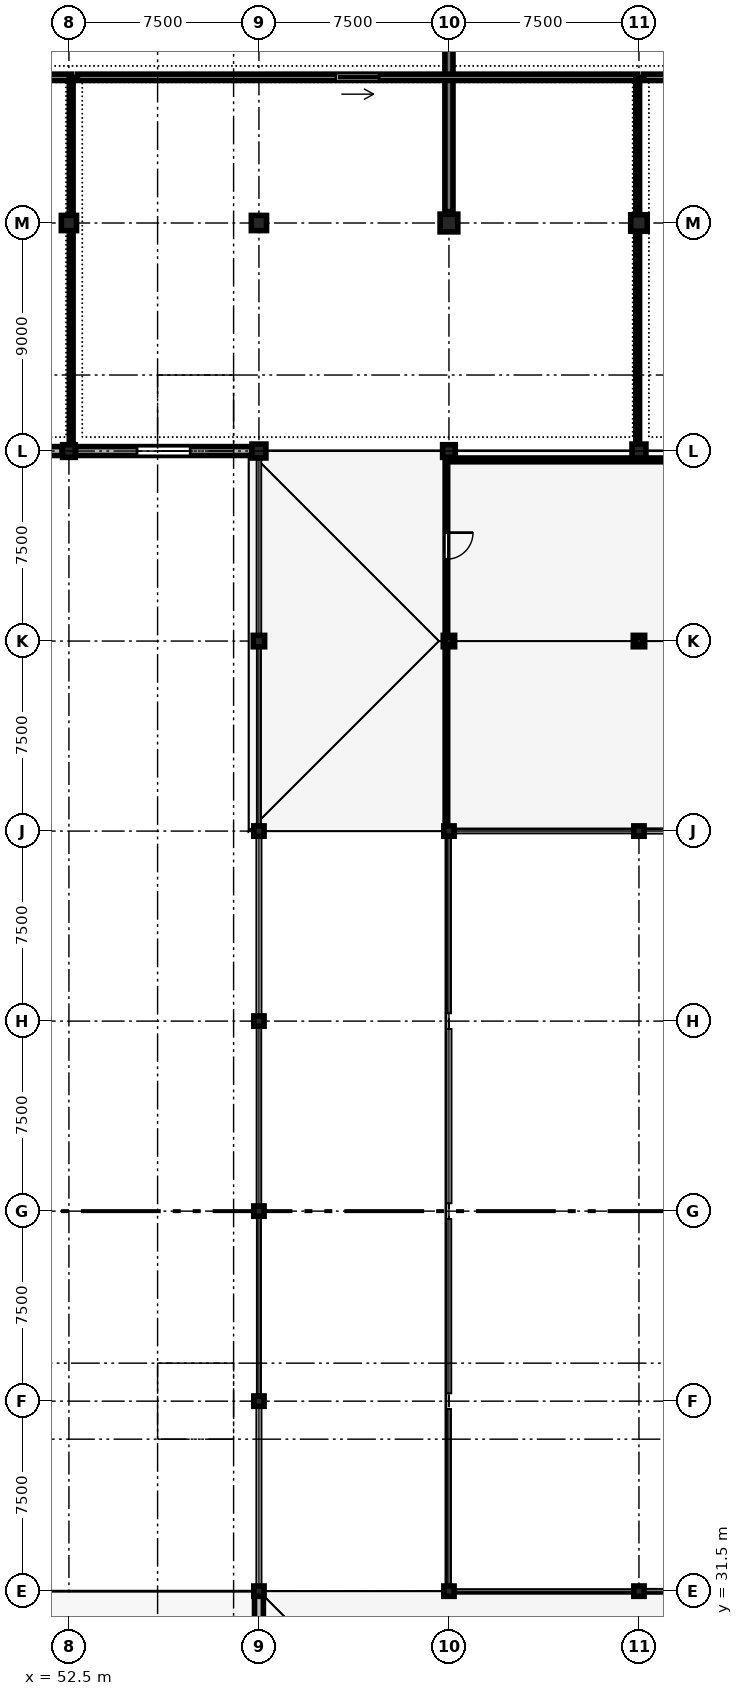
"""IFC4 building model, lengths in metres.
Left out: names, types, materials, properties, quantities, classifications, styles, units other than length and angle.
Written with IfcOpenShell. Run it as: python <this file> out.ifc"""

import sys

from ifc_helpers import new_model, si_unit, direction, frame, frame_2d, origin, origin_2d, place, context, subcontext, project, spatial, rectangle, circle, hollow_circle, i_section, extrude, element, fill, save


model = new_model("IFC4")
c1 = context("Model", 3, precision=1e-05, world=origin(), true_north=direction((0.0, 1.0)))
c2 = subcontext(c1, "Body", "Model", "MODEL_VIEW")
j1 = project(units=[si_unit("LENGTHUNIT", "METRE"), si_unit("PLANEANGLEUNIT", "RADIAN")], contexts=[c1])
p1 = place(None, origin())
s1 = spatial("IfcSite", under=j1, at=p1, CompositionType="ELEMENT")
p2 = place(p1, origin())
s2 = spatial("IfcBuilding", under=s1, at=p2, CompositionType="ELEMENT")
p3 = place(p2, frame((0.0, 0.0, 9.3)))
s3 = spatial("IfcBuildingStorey", under=s2, at=p3, CompositionType="ELEMENT", Elevation=9.3)
p4 = place(p3, frame((52.5, 76.5, 0.0), z_axis=(0.0, 0.0, 1.0), x_axis=(1.0, 0.0, 0.0)))
e1 = element("IfcColumn", 1, at=p4, inside=s3, PredefinedType="COLUMN", context=c2, shape_type="SweptSolid", body=[
    extrude(rectangle(XDim=0.5, YDim=0.5, at=origin_2d()), origin(), (0.0, 0.0, 1.0), 4.8),
])
p5 = place(p3, frame((52.5, 85.5, 0.0), z_axis=(0.0, 0.0, 1.0), x_axis=(1.0, 0.0, 0.0)))
e2 = element("IfcColumn", 2, at=p5, inside=s3, PredefinedType="COLUMN", context=c2, shape_type="SweptSolid", body=[
    extrude(circle(Radius=0.3, at=origin_2d()), origin(), (0.0, 0.0, 1.0), 4.8),
])
for number, where, z_axis, x_axis in (
    (3, (60.0, 31.5, 0.0), (0.0, 0.0, 1.0), (1.0, 0.0, 0.0)),
    (4, (60.0, 39.0, 0.0), (0.0, 0.0, 1.0), (1.0, 0.0, 0.0)),
    (5, (60.0, 46.5, 0.0), (0.0, 0.0, 1.0), (1.0, 0.0, 0.0)),
    (6, (60.0, 54.0, 0.0), (0.0, 0.0, 1.0), (1.0, 0.0, 0.0)),
    (7, (60.0, 61.5, 0.0), (0.0, 0.0, 1.0), (1.0, 0.0, 0.0)),
):
    element("IfcColumn", number, at=place(p3, frame(where, z_axis=z_axis, x_axis=x_axis)), inside=s3, PredefinedType="COLUMN", context=c2, shape_type="SweptSolid", body=[
        extrude(i_section(OverallWidth=0.3, OverallDepth=0.36, WebThickness=0.012, FlangeThickness=0.022, FilletRadius=0.027, at=origin_2d()), origin(), (0.0, 0.0, 1.0), 4.8),
    ])
p6 = place(p3, frame((60.0, 69.0, 0.0), z_axis=(0.0, 0.0, 1.0), x_axis=(1.0, 0.0, 0.0)))
e8 = element("IfcColumn", 8, at=p6, inside=s3, PredefinedType="COLUMN", context=c2, shape_type="SweptSolid", body=[
    extrude(rectangle(XDim=0.45, YDim=0.45, at=origin_2d()), origin(), (0.0, 0.0, 1.0), 4.8),
])
p7 = place(p3, frame((60.0, 76.5, 0.0), z_axis=(0.0, 0.0, 1.0), x_axis=(1.0, 0.0, 0.0)))
e9 = element("IfcColumn", 9, at=p7, inside=s3, PredefinedType="COLUMN", context=c2, shape_type="SweptSolid", body=[
    extrude(rectangle(XDim=0.55, YDim=0.55, at=origin_2d()), origin(), (0.0, 0.0, 1.0), 4.8),
])
p8 = place(p3, frame((60.0, 85.5, 0.0), z_axis=(0.0, 0.0, 1.0), x_axis=(1.0, 0.0, 0.0)))
e10 = element("IfcColumn", 10, at=p8, inside=s3, PredefinedType="COLUMN", context=c2, shape_type="SweptSolid", body=[
    extrude(rectangle(XDim=0.6, YDim=0.6, at=origin_2d()), origin(), (0.0, 0.0, 1.0), 4.8),
])
for number, where, z_axis, x_axis in (
    (11, (67.5, 31.5, 0.0), (0.0, 0.0, 1.0), (1.0, 0.0, 0.0)),
    (12, (67.5, 61.5, 0.0), (0.0, 0.0, 1.0), (1.0, 0.0, 0.0)),
):
    element("IfcColumn", number, at=place(p3, frame(where, z_axis=z_axis, x_axis=x_axis)), inside=s3, PredefinedType="COLUMN", context=c2, shape_type="SweptSolid", body=[
        extrude(i_section(OverallWidth=0.3, OverallDepth=0.36, WebThickness=0.012, FlangeThickness=0.022, FilletRadius=0.027, at=origin_2d()), origin(), (0.0, 0.0, 1.0), 4.8),
    ])
p9 = place(p3, frame((67.5, 69.0, 0.0), z_axis=(0.0, 0.0, 1.0), x_axis=(1.0, 0.0, 0.0)))
e13 = element("IfcColumn", 13, at=p9, inside=s3, PredefinedType="COLUMN", context=c2, shape_type="SweptSolid", body=[
    extrude(rectangle(XDim=0.45, YDim=0.45, at=origin_2d()), origin(), (0.0, 0.0, 1.0), 4.8),
])
p10 = place(p3, frame((67.5, 76.5, 0.0), z_axis=(0.0, 0.0, 1.0), x_axis=(1.0, 0.0, 0.0)))
e14 = element("IfcColumn", 14, at=p10, inside=s3, PredefinedType="COLUMN", context=c2, shape_type="SweptSolid", body=[
    extrude(rectangle(XDim=0.5, YDim=0.5, at=origin_2d()), origin(), (0.0, 0.0, 1.0), 4.8),
])
p11 = place(p3, frame((67.5, 85.5, 0.0), z_axis=(0.0, 0.0, 1.0), x_axis=(1.0, 0.0, 0.0)))
e15 = element("IfcColumn", 15, at=p11, inside=s3, PredefinedType="COLUMN", context=c2, shape_type="SweptSolid", body=[
    extrude(rectangle(XDim=0.7, YDim=0.7, at=origin_2d()), origin(), (0.0, 0.0, 1.0), 4.8),
])
for number, where, z_axis, x_axis in (
    (16, (75.0, 31.5, 0.0), (0.0, 0.0, 1.0), (1.0, 0.0, 0.0)),
    (17, (75.0, 61.5, 0.0), (0.0, 0.0, 1.0), (1.0, 0.0, 0.0)),
):
    element("IfcColumn", number, at=place(p3, frame(where, z_axis=z_axis, x_axis=x_axis)), inside=s3, PredefinedType="COLUMN", context=c2, shape_type="SweptSolid", body=[
        extrude(i_section(OverallWidth=0.3, OverallDepth=0.36, WebThickness=0.012, FlangeThickness=0.022, FilletRadius=0.027, at=origin_2d()), origin(), (0.0, 0.0, 1.0), 4.8),
    ])
p12 = place(p3, frame((75.0, 69.0, 0.0), z_axis=(0.0, 0.0, 1.0), x_axis=(1.0, 0.0, 0.0)))
e18 = element("IfcColumn", 18, at=p12, inside=s3, PredefinedType="COLUMN", context=c2, shape_type="SweptSolid", body=[
    extrude(rectangle(XDim=0.45, YDim=0.45, at=origin_2d()), origin(), (0.0, 0.0, 1.0), 4.8),
])
p13 = place(p3, frame((75.0, 76.5, 0.0), z_axis=(0.0, 0.0, 1.0), x_axis=(1.0, 0.0, 0.0)))
e19 = element("IfcColumn", 19, at=p13, inside=s3, PredefinedType="COLUMN", context=c2, shape_type="SweptSolid", body=[
    extrude(rectangle(XDim=0.55, YDim=0.55, at=origin_2d()), origin(), (0.0, 0.0, 1.0), 4.8),
])
p14 = place(p3, frame((75.0, 85.5, 0.0), z_axis=(0.0, 0.0, 1.0), x_axis=(1.0, 0.0, 0.0)))
e20 = element("IfcColumn", 20, at=p14, inside=s3, PredefinedType="COLUMN", context=c2, shape_type="SweptSolid", body=[
    extrude(rectangle(XDim=0.65, YDim=0.65, at=origin_2d()), origin(), (0.0, 0.0, 1.0), 4.8),
])
p15 = place(p3, frame((67.5, 85.95, 0.0), z_axis=(0.0, 0.0, 1.0), x_axis=(0.0, 1.0, 0.0)))
e21 = element("IfcWall", 21, at=p15, inside=s3, PredefinedType="SHEAR", context=c2, shape_type="SweptSolid", body=[
    extrude(rectangle(XDim=6.6, YDim=0.32, at=frame_2d((3.3, 0.0))), origin(), (0.0, 0.0, 1.0), 4.0),
])
p16 = place(p3, frame((60.0, 31.5, 4.8), z_axis=(0.0, 0.0, 1.0), x_axis=(1.0, 0.0, 0.0)))
e22 = element("IfcColumn", 22, at=p16, inside=s3, PredefinedType="COLUMN", context=c2, shape_type="SweptSolid", body=[
    extrude(hollow_circle(Radius=0.203, WallThickness=0.016, at=origin_2d()), origin(), (0.0, 0.0, 1.0), 2.75),
])
p17 = place(p3, frame((60.0, 39.0, 4.8), z_axis=(0.0, 0.0, 1.0), x_axis=(1.0, 0.0, 0.0)))
e23 = element("IfcColumn", 23, at=p17, inside=s3, PredefinedType="COLUMN", context=c2, shape_type="SweptSolid", body=[
    extrude(hollow_circle(Radius=0.203, WallThickness=0.016, at=origin_2d()), origin(), (0.0, 0.0, 1.0), 4.4),
])
p18 = place(p3, frame((60.0, 46.5, 4.8), z_axis=(0.0, 0.0, 1.0), x_axis=(1.0, 0.0, 0.0)))
e24 = element("IfcColumn", 24, at=p18, inside=s3, PredefinedType="COLUMN", context=c2, shape_type="SweptSolid", body=[
    extrude(hollow_circle(Radius=0.203, WallThickness=0.016, at=origin_2d()), origin(), (0.0, 0.0, 1.0), 4.95),
])
p19 = place(p3, frame((60.0, 54.0, 4.8), z_axis=(0.0, 0.0, 1.0), x_axis=(1.0, 0.0, 0.0)))
e25 = element("IfcColumn", 25, at=p19, inside=s3, PredefinedType="COLUMN", context=c2, shape_type="SweptSolid", body=[
    extrude(hollow_circle(Radius=0.203, WallThickness=0.016, at=origin_2d()), origin(), (0.0, 0.0, 1.0), 4.4),
])
p20 = place(p3, frame((60.0, 61.5, 4.8), z_axis=(0.0, 0.0, 1.0), x_axis=(1.0, 0.0, 0.0)))
e26 = element("IfcColumn", 26, at=p20, inside=s3, PredefinedType="COLUMN", context=c2, shape_type="SweptSolid", body=[
    extrude(hollow_circle(Radius=0.203, WallThickness=0.016, at=origin_2d()), origin(), (0.0, 0.0, 1.0), 2.75),
])
for number, where, z_axis, x_axis in (
    (27, (67.5, 31.5, 4.8), (0.0, 0.0, 1.0), (1.0, 0.0, 0.0)),
    (28, (67.5, 61.5, 4.8), (0.0, 0.0, 1.0), (1.0, 0.0, 0.0)),
):
    element("IfcColumn", number, at=place(p3, frame(where, z_axis=z_axis, x_axis=x_axis)), inside=s3, PredefinedType="COLUMN", context=c2, shape_type="SweptSolid", body=[
        extrude(hollow_circle(Radius=0.203, WallThickness=0.016, at=origin_2d()), origin(), (0.0, 0.0, 1.0), 4.415),
    ])
for number, where, z_axis, x_axis in (
    (29, (75.0, 31.5, 4.8), (0.0, 0.0, 1.0), (1.0, 0.0, 0.0)),
    (30, (75.0, 61.5, 4.8), (0.0, 0.0, 1.0), (1.0, 0.0, 0.0)),
):
    element("IfcColumn", number, at=place(p3, frame(where, z_axis=z_axis, x_axis=x_axis)), inside=s3, PredefinedType="COLUMN", context=c2, shape_type="SweptSolid", body=[
        extrude(hollow_circle(Radius=0.203, WallThickness=0.016, at=origin_2d()), origin(), (0.0, 0.0, 1.0), 5.525),
    ])
for number, where, z_axis, x_axis in (
    (31, (67.5, 69.0, 4.8), (0.0, 0.0, 1.0), (1.0, 0.0, 0.0)),
    (32, (75.0, 69.0, 4.8), (0.0, 0.0, 1.0), (1.0, 0.0, 0.0)),
):
    element("IfcColumn", number, at=place(p3, frame(where, z_axis=z_axis, x_axis=x_axis)), inside=s3, PredefinedType="COLUMN", context=c2, shape_type="SweptSolid", body=[
        extrude(i_section(OverallWidth=0.3, OverallDepth=0.3, WebThickness=0.011, FlangeThickness=0.019, FilletRadius=0.027, at=origin_2d()), origin(), (0.0, 0.0, 1.0), 1.872),
    ])
p21 = place(p3, frame((52.24, 76.5, 0.0), z_axis=(0.0, 0.0, 1.0), x_axis=(-1.0, 0.0, 0.0)))
e33 = element("IfcWall", 33, at=p21, inside=s3, PredefinedType="STANDARD", context=c2, shape_type="SweptSolid", body=[
    extrude(rectangle(XDim=6.955, YDim=0.35, at=frame_2d((3.478, 0.0))), origin(), (0.0, 0.0, 1.0), 3.95),
])
p22 = place(p21, frame((2.877, 0.0, 0.9)))
e34 = element("IfcOpeningElement", 34, at=p22, cuts=e33, PredefinedType="OPENING", context=c2, shape_type="SweptSolid", body=[
    extrude(rectangle(XDim=1.2, YDim=2.1, at=frame_2d((0.6, 1.05))), frame((0.0, 0.185, 0.0), z_axis=(0.0, -1.0, 0.0), x_axis=(1.0, 0.0, 0.0)), (0.0, 0.0, 1.0), 0.37),
])
p23 = place(p3, frame((59.715, 76.5, 0.0), z_axis=(0.0, 0.0, 1.0), x_axis=(-1.0, 0.0, 0.0)))
e35 = element("IfcWall", 35, at=p23, inside=s3, PredefinedType="STANDARD", context=c2, shape_type="SweptSolid", body=[
    extrude(rectangle(XDim=6.955, YDim=0.35, at=frame_2d((3.478, 0.0))), origin(), (0.0, 0.0, 1.0), 3.95),
])
p24 = place(p23, frame((2.427, 0.0, 0.9)))
e36 = element("IfcOpeningElement", 36, at=p24, cuts=e35, PredefinedType="OPENING", context=c2, shape_type="SweptSolid", body=[
    extrude(rectangle(XDim=2.1, YDim=2.1, at=frame_2d((1.05, 1.05))), frame((0.0, 0.185, 0.0), z_axis=(0.0, -1.0, 0.0), x_axis=(1.0, 0.0, 0.0)), (0.0, 0.0, 1.0), 0.37),
])
p25 = place(p3, frame((60.0, 22.81, 0.0), z_axis=(0.0, 0.0, 1.0), x_axis=(0.0, 1.0, 0.0)))
e37 = element("IfcWall", 37, at=p25, inside=s3, PredefinedType="STANDARD", context=c2, shape_type="SweptSolid", body=[
    extrude(rectangle(XDim=8.5, YDim=0.35, at=frame_2d((4.25, 0.0))), origin(), (0.0, 0.0, 1.0), 4.55),
])
p26 = place(p25, frame((3.45, 0.0, 0.0)))
e38 = element("IfcOpeningElement", 38, at=p26, cuts=e37, PredefinedType="OPENING", context=c2, shape_type="SweptSolid", body=[
    extrude(rectangle(XDim=1.6, YDim=2.35, at=frame_2d((0.8, 1.175))), frame((0.0, 0.185, 0.0), z_axis=(0.0, -1.0, 0.0), x_axis=(1.0, 0.0, 0.0)), (0.0, 0.0, 1.0), 0.37),
])
p27 = place(p3, frame((67.4, 76.15, 0.0), z_axis=(0.0, 0.0, 1.0), x_axis=(0.0, -1.0, 0.0)))
e39 = element("IfcWall", 39, at=p27, inside=s3, PredefinedType="PARTITIONING", context=c2, shape_type="SweptSolid", body=[
    extrude(rectangle(XDim=14.65, YDim=0.1, at=frame_2d((7.325, 0.0))), origin(), (0.0, 0.0, 1.0), 4.535),
])
p28 = place(p27, frame((2.87, 0.0, 0.0)))
e40 = element("IfcOpeningElement", 40, at=p28, cuts=e39, PredefinedType="OPENING", context=c2, shape_type="SweptSolid", body=[
    extrude(rectangle(XDim=1.05, YDim=2.2, at=frame_2d((0.525, 1.1))), frame((0.0, 0.06, 0.0), z_axis=(0.0, -1.0, 0.0), x_axis=(1.0, 0.0, 0.0)), (0.0, 0.0, 1.0), 0.12),
])
p29 = place(p3, frame((52.59, 91.25, 0.0), z_axis=(0.0, 0.0, 1.0), x_axis=(-1.0, 0.0, 0.0)))
e41 = element("IfcWall", 41, at=p29, inside=s3, PredefinedType="STANDARD", context=c2, shape_type="SweptSolid", body=[
    extrude(rectangle(XDim=22.12, YDim=0.25, at=frame_2d((11.06, 0.0))), origin(), (0.0, 0.0, 1.0), 4.535),
])
p30 = place(p29, frame((18.178, 0.0, 0.0)))
e42 = element("IfcOpeningElement", 42, at=p30, cuts=e41, PredefinedType="OPENING", context=c2, shape_type="SweptSolid", body=[
    extrude(rectangle(XDim=1.7, YDim=2.4, at=frame_2d((0.85, 1.2))), frame((0.0, 0.135, 0.0), z_axis=(0.0, -1.0, 0.0), x_axis=(1.0, 0.0, 0.0)), (0.0, 0.0, 1.0), 0.27),
])
p31 = place(p3, frame((74.95, 91.25, 0.0), z_axis=(0.0, 0.0, 1.0), x_axis=(-1.0, 0.0, 0.0)))
e43 = element("IfcWall", 43, at=p31, inside=s3, PredefinedType="STANDARD", context=c2, shape_type="SweptSolid", body=[
    extrude(rectangle(XDim=22.12, YDim=0.25, at=frame_2d((11.06, 0.0))), origin(), (0.0, 0.0, 1.0), 4.535),
])
p32 = place(p31, frame((10.21, 0.0, 0.0)))
e44 = element("IfcOpeningElement", 44, at=p32, cuts=e43, PredefinedType="OPENING", context=c2, shape_type="SweptSolid", body=[
    extrude(rectangle(XDim=1.7, YDim=2.4, at=frame_2d((0.85, 1.2))), frame((0.0, 0.135, 0.0), z_axis=(0.0, -1.0, 0.0), x_axis=(1.0, 0.0, 0.0)), (0.0, 0.0, 1.0), 0.27),
])
p33 = place(p3, frame((97.31, 91.25, 0.0), z_axis=(0.0, 0.0, 1.0), x_axis=(-1.0, 0.0, 0.0)))
e45 = element("IfcWall", 45, at=p33, inside=s3, PredefinedType="STANDARD", context=c2, shape_type="SweptSolid", body=[
    extrude(rectangle(XDim=22.12, YDim=0.25, at=frame_2d((11.06, 0.0))), origin(), (0.0, 0.0, 1.0), 4.535),
])
p34 = place(p33, frame((10.21, 0.0, 0.0)))
e46 = element("IfcOpeningElement", 46, at=p34, cuts=e45, PredefinedType="OPENING", context=c2, shape_type="SweptSolid", body=[
    extrude(rectangle(XDim=1.7, YDim=2.4, at=frame_2d((0.85, 1.2))), frame((0.0, 0.135, 0.0), z_axis=(0.0, -1.0, 0.0), x_axis=(1.0, 0.0, 0.0)), (0.0, 0.0, 1.0), 0.27),
])
p35 = place(p3, frame((67.4, 76.15, 0.0), z_axis=(0.0, 0.0, 1.0), x_axis=(1.0, 0.0, 0.0)))
e47 = element("IfcWall", 47, at=p35, inside=s3, PredefinedType="PARTITIONING", context=c2, shape_type="SweptSolid", body=[
    extrude(rectangle(XDim=44.75, YDim=0.15, at=frame_2d((22.375, 0.0))), origin(), (0.0, 0.0, 1.0), 3.935),
])
for number, where, z_axis, x_axis in (
    (48, (52.59, 76.85, 0.0), (0.0, 0.0, 1.0), (0.0, 1.0, 0.0)),
    (49, (74.95, 76.85, 0.0), (0.0, 0.0, 1.0), (0.0, 1.0, 0.0)),
):
    element("IfcWall", number, at=place(p3, frame(where, z_axis=z_axis, x_axis=x_axis)), inside=s3, PredefinedType="PARTITIONING", context=c2, shape_type="SweptSolid", body=[
        extrude(rectangle(XDim=14.4, YDim=0.15, at=frame_2d((7.2, 0.0))), origin(), (0.0, 0.0, 1.0), 3.835),
    ])
p36 = place(p24, origin())
e50 = element("IfcWindow", 50, at=p36, inside=s3, PartitioningType="SINGLE_PANEL", PredefinedType="WINDOW", context=c2, shape_type="SweptSolid", body=[
    extrude(rectangle(XDim=2.1, YDim=2.1, at=frame_2d((1.05, 1.05))), frame((0.0, 0.03, 0.0), z_axis=(0.0, -1.0, 0.0), x_axis=(1.0, 0.0, 0.0)), (0.0, 0.0, 1.0), 0.06),
])
fill(e36, e50)
p37 = place(p28, origin())
e51 = element("IfcDoor", 51, at=p37, inside=s3, OperationType="SINGLE_SWING_LEFT", PredefinedType="DOOR", context=c2, shape_type="SweptSolid", body=[
    extrude(rectangle(XDim=1.05, YDim=2.2, at=frame_2d((0.525, 1.1))), frame((0.0, 0.025, 0.0), z_axis=(0.0, -1.0, 0.0), x_axis=(1.0, 0.0, 0.0)), (0.0, 0.0, 1.0), 0.05),
])
fill(e40, e51)
p38 = place(p32, origin())
e52 = element("IfcDoor", 52, at=p38, inside=s3, OperationType="DOUBLE_DOOR_SLIDING", PredefinedType="DOOR", context=c2, shape_type="SweptSolid", body=[
    extrude(rectangle(XDim=1.7, YDim=2.4, at=frame_2d((0.85, 1.2))), frame((0.0, 0.025, 0.0), z_axis=(0.0, -1.0, 0.0), x_axis=(1.0, 0.0, 0.0)), (0.0, 0.0, 1.0), 0.05),
])
fill(e44, e52)
save(model, sys.argv[1])
